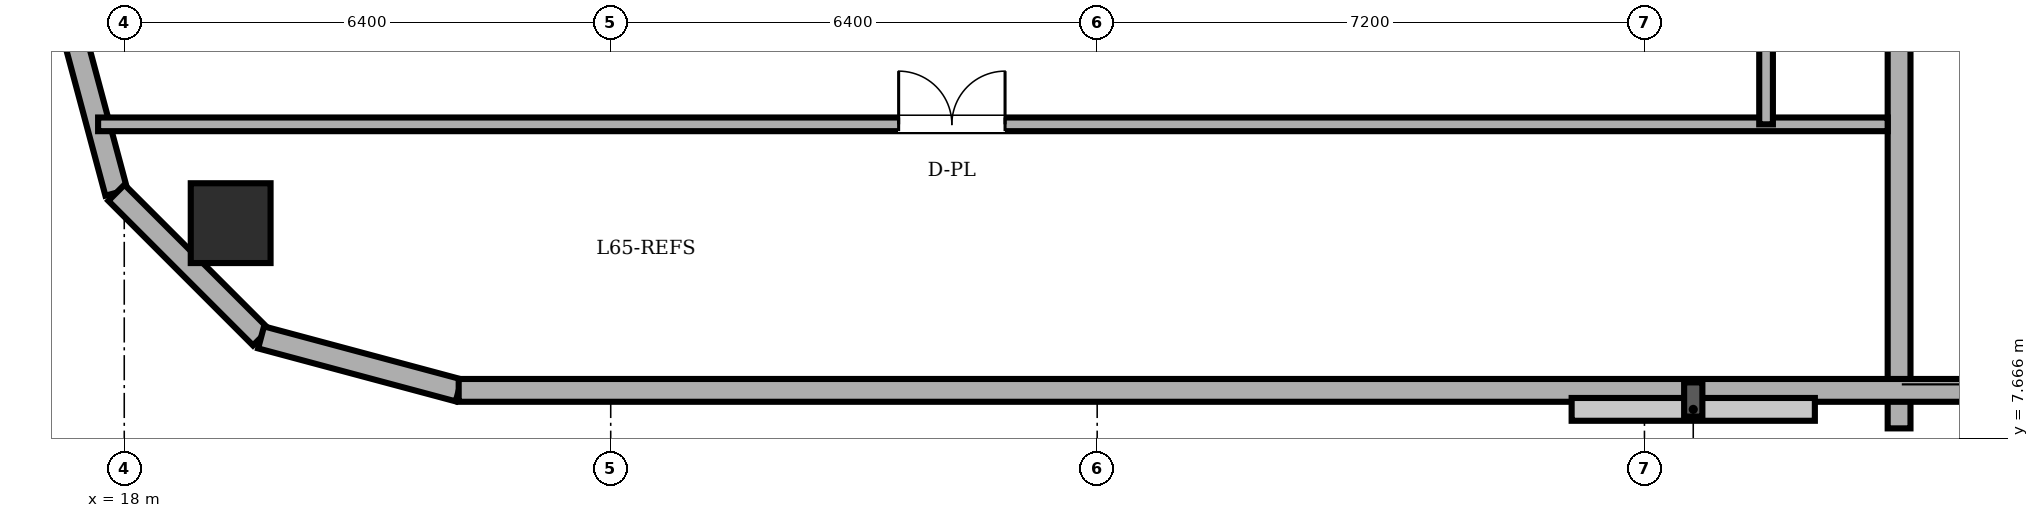
"""IFC4 building model, lengths in metres.
Left out: names, types, materials, properties, quantities, classifications, styles, units other than length and angle.
Written with IfcOpenShell. Run it as: python <this file> out.ifc"""

import sys

from ifc_helpers import new_model, si_unit, direction, frame, frame_2d, origin, origin_2d, place, context, subcontext, project, spatial, rectangle, circle, extrude, element, fill, save


model = new_model("IFC4")
c1 = context("Model", 3, precision=1e-05, world=origin(), true_north=direction((0.0, 1.0)))
c2 = subcontext(c1, "Body", "Model", "MODEL_VIEW")
j1 = project(units=[si_unit("LENGTHUNIT", "METRE"), si_unit("PLANEANGLEUNIT", "RADIAN")], contexts=[c1])
p1 = place(None, origin())
s1 = spatial("IfcSite", under=j1, at=p1, CompositionType="ELEMENT")
p2 = place(p1, origin())
s2 = spatial("IfcBuilding", under=s1, at=p2, CompositionType="ELEMENT")
p3 = place(p2, frame((0.0, 0.0, 248.1)))
s3 = spatial("IfcBuildingStorey", under=s2, at=p3, CompositionType="ELEMENT", Elevation=248.1)
p4 = place(p3, frame((19.4, 10.5, 0.0), z_axis=(0.0, 0.0, 1.0), x_axis=(1.0, 0.0, 0.0)))
e1 = element("IfcColumn", 1, at=p4, inside=s3, PredefinedType="COLUMN", context=c2, shape_type="SweptSolid", body=[
    extrude(circle(Radius=0.525, at=origin_2d()), origin(), (0.0, 0.0, 1.0), 2.96),
])
p5 = place(p3, frame((41.35, 7.8, 0.0), z_axis=(0.0, 0.0, 1.0), x_axis=(0.0, 1.0, 0.0)))
e2 = element("IfcWall", 2, at=p5, inside=s3, PredefinedType="SOLIDWALL", context=c2, shape_type="SweptSolid", body=[
    extrude(rectangle(XDim=32.4, YDim=0.3, at=frame_2d((16.2, 0.0))), origin(), (0.0, 0.0, 1.0), 5.36),
])
p6 = place(p3, frame((17.2, 13.5, 0.0), z_axis=(0.0, 0.0, 1.0), x_axis=(0.258932525951, -0.965895412042, 0.0)))
e3 = element("IfcWall", 3, at=p6, inside=s3, PredefinedType="SOLIDWALL", context=c2, shape_type="SweptSolid", body=[
    extrude(rectangle(XDim=2.692, YDim=0.3, at=frame_2d((1.346, 0.0))), origin(), (0.0, 0.0, 1.0), 5.36),
])
p7 = place(p3, frame((17.897, 10.9, 0.0), z_axis=(0.0, 0.0, 1.0), x_axis=(0.707152139074, -0.70706142039, 0.0)))
e4 = element("IfcWall", 4, at=p7, inside=s3, PredefinedType="SOLIDWALL", context=c2, shape_type="SweptSolid", body=[
    extrude(rectangle(XDim=2.691, YDim=0.3, at=frame_2d((1.346, 0.0))), origin(), (0.0, 0.0, 1.0), 5.36),
])
p8 = place(p3, frame((19.8, 8.997, 0.0), z_axis=(0.0, 0.0, 1.0), x_axis=(0.965889330541, -0.258955210695, 0.0)))
e5 = element("IfcWall", 5, at=p8, inside=s3, PredefinedType="SOLIDWALL", context=c2, shape_type="SweptSolid", body=[
    extrude(rectangle(XDim=2.692, YDim=0.3, at=frame_2d((1.346, 0.0))), origin(), (0.0, 0.0, 1.0), 5.36),
])
p9 = place(p3, frame((22.4, 8.3, 0.0), z_axis=(0.0, 0.0, 1.0), x_axis=(1.0, 0.0, 0.0)))
e6 = element("IfcWall", 6, at=p9, inside=s3, PredefinedType="SOLIDWALL", context=c2, shape_type="SweptSolid", body=[
    extrude(rectangle(XDim=32.485, YDim=0.3, at=frame_2d((16.243, 0.0))), origin(), (0.0, 0.0, 1.0), 5.36),
])
p10 = place(p3, frame((17.656, 11.8, 0.0), z_axis=(0.0, 0.0, 1.0), x_axis=(1.0, 0.0, 0.0)))
e7 = element("IfcWall", 7, at=p10, inside=s3, PredefinedType="PARTITIONING", context=c2, shape_type="SweptSolid", body=[
    extrude(rectangle(XDim=23.544, YDim=0.18, at=frame_2d((11.772, 0.0))), origin(), (0.0, 0.0, 1.0), 5.36),
])
p11 = place(p10, frame((10.532, 0.0, 0.0)))
e8 = element("IfcOpeningElement", 8, at=p11, cuts=e7, PredefinedType="OPENING", context=c2, shape_type="SweptSolid", body=[
    extrude(rectangle(XDim=1.4, YDim=2.25, at=frame_2d((0.7, 1.125))), frame((0.0, 0.1, 0.0), z_axis=(0.0, -1.0, 0.0), x_axis=(1.0, 0.0, 0.0)), (0.0, 0.0, 1.0), 0.2),
])
p12 = place(p3, frame((39.6, 11.8, 0.0), z_axis=(0.0, 0.0, 1.0), x_axis=(0.0, 1.0, 0.0)))
e9 = element("IfcWall", 9, at=p12, inside=s3, PredefinedType="PARTITIONING", context=c2, shape_type="SweptSolid", body=[
    extrude(rectangle(XDim=24.4, YDim=0.18, at=frame_2d((12.2, 0.0))), origin(), (0.0, 0.0, 1.0), 5.36),
])
p13 = place(p12, frame((11.5, 0.0, 0.0)))
e10 = element("IfcOpeningElement", 10, at=p13, cuts=e9, PredefinedType="OPENING", context=c2, shape_type="SweptSolid", body=[
    extrude(rectangle(XDim=1.4, YDim=2.25, at=frame_2d((0.7, 1.125))), frame((0.0, 0.1, 0.0), z_axis=(0.0, -1.0, 0.0), x_axis=(1.0, 0.0, 0.0)), (0.0, 0.0, 1.0), 0.2),
])
p14 = place(p11, origin())
e11 = element("IfcDoor", 11, at=p14, inside=s3, OperationType="DOUBLE_DOOR_SINGLE_SWING", PredefinedType="DOOR", context=c2, shape_type="SweptSolid", body=[
    extrude(rectangle(XDim=1.4, YDim=2.25, at=frame_2d((0.7, 1.125))), frame((0.0, 0.025, 0.0), z_axis=(0.0, -1.0, 0.0), x_axis=(1.0, 0.0, 0.0)), (0.0, 0.0, 1.0), 0.05),
])
fill(e8, e11)
save(model, sys.argv[1])
